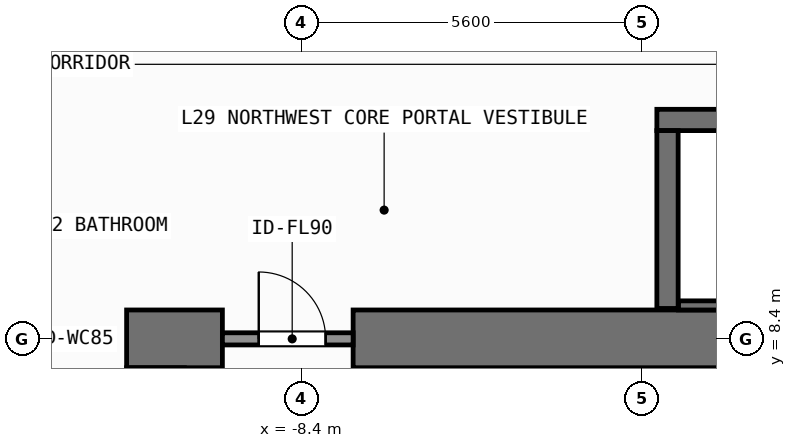
"""IFC4 building model, lengths in metres.
Left out: names, types, materials, properties, quantities, classifications, styles, units other than length and angle.
Written with IfcOpenShell. Run it as: python <this file> out.ifc"""

import sys

from ifc_helpers import new_model, si_unit, direction, frame, frame_2d, origin, place, context, subcontext, project, spatial, rectangle, extrude, element, fill, save


model = new_model("IFC4")
c1 = context("Model", 3, precision=1e-05, world=origin(), true_north=direction((0.0, 1.0)))
c2 = subcontext(c1, "Body", "Model", "MODEL_VIEW")
j1 = project(units=[si_unit("LENGTHUNIT", "METRE"), si_unit("PLANEANGLEUNIT", "RADIAN")], contexts=[c1])
p1 = place(None, origin())
s1 = spatial("IfcSite", under=j1, at=p1, CompositionType="ELEMENT")
p2 = place(p1, origin())
s2 = spatial("IfcBuilding", under=s1, at=p2, CompositionType="ELEMENT")
p3 = place(p2, frame((0.0, 0.0, 117.3)))
s3 = spatial("IfcBuildingStorey", under=s2, at=p3, CompositionType="ELEMENT", Elevation=117.3)
p4 = place(p3, frame((-11.275, 8.4, 0.0), z_axis=(0.0, 0.0, 1.0), x_axis=(1.0, 0.0, 0.0)))
e1 = element("IfcWall", 1, at=p4, inside=s3, PredefinedType="SHEAR", context=c2, shape_type="SweptSolid", body=[
    extrude(rectangle(XDim=1.575, YDim=0.95, at=frame_2d((0.788, 0.0))), origin(), (0.0, 0.0, 1.0), 3.9),
])
p5 = place(p3, frame((-7.55, 8.4, 0.0), z_axis=(0.0, 0.0, 1.0), x_axis=(1.0, 0.0, 0.0)))
e2 = element("IfcWall", 2, at=p5, inside=s3, PredefinedType="SHEAR", context=c2, shape_type="SweptSolid", body=[
    extrude(rectangle(XDim=16.425, YDim=0.95, at=frame_2d((8.212, 0.0))), origin(), (0.0, 0.0, 1.0), 3.9),
])
p6 = place(p3, frame((-10.8, -7.925, 0.0), z_axis=(0.0, 0.0, 1.0), x_axis=(0.0, 1.0, 0.0)))
e3 = element("IfcWall", 3, at=p6, inside=s3, PredefinedType="SHEAR", context=c2, shape_type="SweptSolid", body=[
    extrude(rectangle(XDim=15.85, YDim=0.95, at=frame_2d((7.925, 0.0))), origin(), (0.0, 0.0, 1.0), 3.9),
])
p7 = place(p3, frame((-2.555, 12.0, 0.0), z_axis=(0.0, 0.0, 1.0), x_axis=(1.0, 0.0, 0.0)))
e4 = element("IfcWall", 4, at=p7, inside=s3, PredefinedType="SHEAR", context=c2, shape_type="SweptSolid", body=[
    extrude(rectangle(XDim=7.31, YDim=0.35, at=frame_2d((3.655, 0.0))), origin(), (0.0, 0.0, 1.0), 3.9),
])
p8 = place(p3, frame((-2.2, 8.95, 0.0), z_axis=(0.0, 0.0, 1.0), x_axis=(1.0, 0.0, 0.0)))
e5 = element("IfcWall", 5, at=p8, inside=s3, PredefinedType="SHEAR", context=c2, shape_type="SweptSolid", body=[
    extrude(rectangle(XDim=6.6, YDim=0.15, at=frame_2d((3.3, 0.0))), origin(), (0.0, 0.0, 1.0), 3.9),
])
p9 = place(p3, frame((-2.38, 8.9, 0.0), z_axis=(0.0, 0.0, 1.0), x_axis=(0.0, 1.0, 0.0)))
e6 = element("IfcWall", 6, at=p9, inside=s3, PredefinedType="SHEAR", context=c2, shape_type="SweptSolid", body=[
    extrude(rectangle(XDim=2.925, YDim=0.35, at=frame_2d((1.462, 0.0))), origin(), (0.0, 0.0, 1.0), 3.9),
])
p10 = place(p3, frame((-9.7, 8.4, 0.0), z_axis=(0.0, 0.0, 1.0), x_axis=(1.0, 0.0, 0.0)))
e7 = element("IfcWall", 7, at=p10, inside=s3, PredefinedType="SOLIDWALL", context=c2, shape_type="SweptSolid", body=[
    extrude(rectangle(XDim=2.15, YDim=0.2, at=frame_2d((1.075, 0.0))), origin(), (0.0, 0.0, 1.0), 2.72),
])
p11 = place(p10, frame((0.598, 0.0, 0.0)))
e8 = element("IfcOpeningElement", 8, at=p11, cuts=e7, PredefinedType="OPENING", context=c2, shape_type="SweptSolid", body=[
    extrude(rectangle(XDim=1.1, YDim=2.15, at=frame_2d((0.55, 1.075))), frame((0.0, 0.11, 0.0), z_axis=(0.0, -1.0, 0.0), x_axis=(1.0, 0.0, 0.0)), (0.0, 0.0, 1.0), 0.22),
])
p12 = place(p11, origin())
e9 = element("IfcDoor", 9, at=p12, inside=s3, OperationType="SINGLE_SWING_LEFT", PredefinedType="DOOR", context=c2, shape_type="SweptSolid", body=[
    extrude(rectangle(XDim=1.1, YDim=2.15, at=frame_2d((0.55, 1.075))), frame((0.0, 0.025, 0.0), z_axis=(0.0, -1.0, 0.0), x_axis=(1.0, 0.0, 0.0)), (0.0, 0.0, 1.0), 0.05),
])
fill(e8, e9)
save(model, sys.argv[1])
